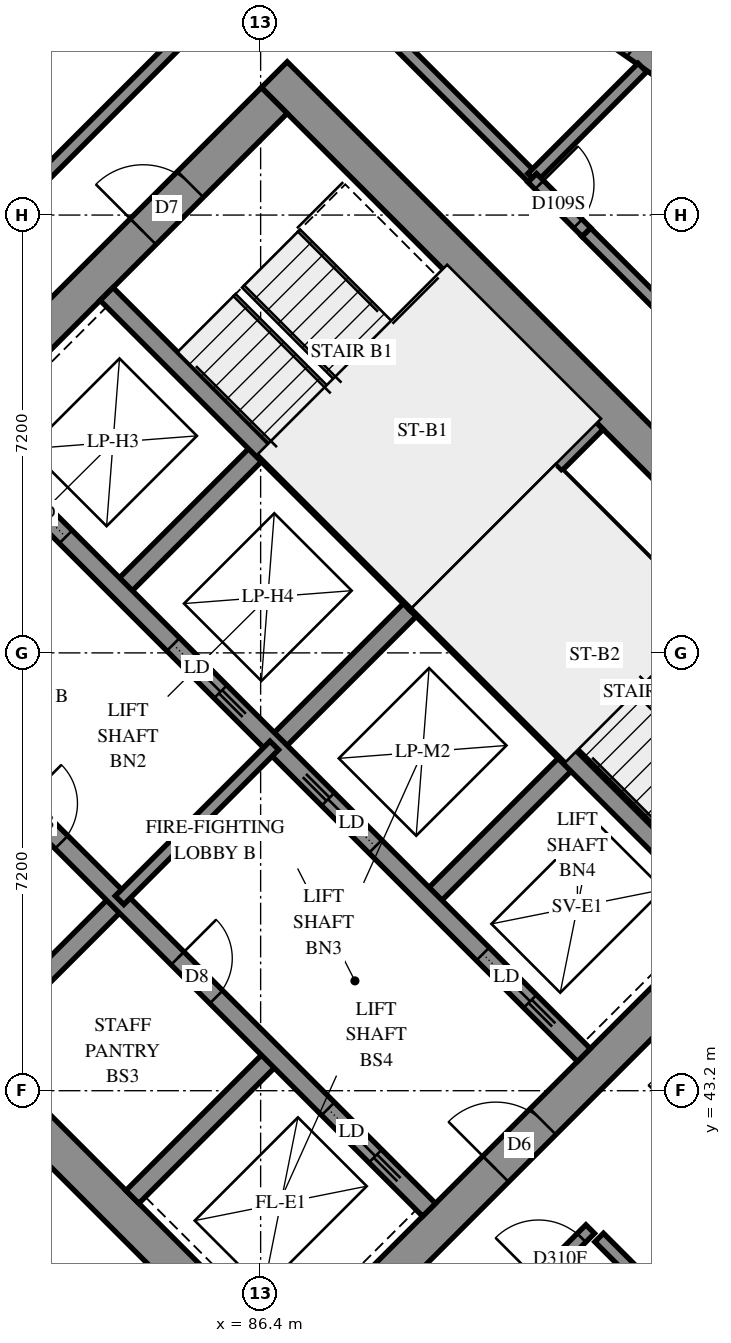
"""IFC4 building model, lengths in metres.
Left out: names, types, materials, properties, quantities, classifications, styles, units other than length and angle.
Written with IfcOpenShell. Run it as: python <this file> out.ifc"""

import sys

from ifc_helpers import new_model, si_unit, direction, frame, frame_2d, origin, place, context, subcontext, project, spatial, polyline, rectangle, outline, extrude, element, fill, save


model = new_model("IFC4")
c1 = context("Model", 3, precision=1e-05, world=origin(), true_north=direction((0.0, 1.0)))
c2 = subcontext(c1, "Body", "Model", "MODEL_VIEW")
j1 = project(units=[si_unit("LENGTHUNIT", "METRE"), si_unit("PLANEANGLEUNIT", "RADIAN")], contexts=[c1])
p1 = place(None, origin())
s1 = spatial("IfcSite", under=j1, at=p1, CompositionType="ELEMENT")
p2 = place(p1, origin())
s2 = spatial("IfcBuilding", under=s1, at=p2, CompositionType="ELEMENT")
p3 = place(p2, frame((0.0, 0.0, 169.4)))
s3 = spatial("IfcBuildingStorey", under=s2, at=p3, CompositionType="ELEMENT", Elevation=169.4)
p4 = place(p3, frame((76.018, 49.302, -0.3), z_axis=(0.0, 0.0, 1.0), x_axis=(0.7071067812, -0.7071067812, 0.0)))
e1 = element("IfcWall", 1, at=p4, inside=s3, PredefinedType="SHEAR", context=c2, shape_type="SweptSolid", body=[
    extrude(rectangle(XDim=15.6, YDim=0.6, at=frame_2d((7.8, 0.0))), origin(), (0.0, 0.0, 1.0), 2.7),
])
p5 = place(p3, frame((86.625, 59.908, -0.3), z_axis=(0.0, 0.0, 1.0), x_axis=(0.7071067812, -0.7071067812, 0.0)))
e2 = element("IfcWall", 2, at=p5, inside=s3, PredefinedType="SHEAR", context=c2, shape_type="SweptSolid", body=[
    extrude(rectangle(XDim=15.6, YDim=0.6, at=frame_2d((7.8, 0.0))), origin(), (0.0, 0.0, 1.0), 2.7),
])
p6 = place(p5, frame((10.6, 0.0, 0.3)))
e3 = element("IfcOpeningElement", 3, at=p6, cuts=e2, PredefinedType="OPENING", context=c2, shape_type="SweptSolid", body=[
    extrude(rectangle(XDim=0.8, YDim=2.1, at=frame_2d((0.4, 1.05))), frame((0.0, 0.31, 0.0), z_axis=(0.0, -1.0, 0.0), x_axis=(1.0, 0.0, 0.0)), (0.0, 0.0, 1.0), 0.62),
])
p7 = place(p3, frame((76.442, 49.302, -0.3), z_axis=(0.0, 0.0, 1.0), x_axis=(0.7071067812, 0.7071067812, 0.0)))
e4 = element("IfcWall", 4, at=p7, inside=s3, PredefinedType="SHEAR", context=c2, shape_type="SweptSolid", body=[
    extrude(rectangle(XDim=14.4, YDim=0.6, at=frame_2d((7.2, 0.0))), origin(), (0.0, 0.0, 1.0), 2.7),
])
p8 = place(p7, frame((4.55, 0.0, 0.3)))
e5 = element("IfcOpeningElement", 5, at=p8, cuts=e4, PredefinedType="OPENING", context=c2, shape_type="SweptSolid", body=[
    extrude(rectangle(XDim=1.1, YDim=2.1, at=frame_2d((0.55, 1.05))), frame((0.0, 0.31, 0.0), z_axis=(0.0, -1.0, 0.0), x_axis=(1.0, 0.0, 0.0)), (0.0, 0.0, 1.0), 0.62),
])
p9 = place(p7, frame((11.35, 0.0, 0.3)))
e6 = element("IfcOpeningElement", 6, at=p9, cuts=e4, PredefinedType="OPENING", context=c2, shape_type="SweptSolid", body=[
    extrude(rectangle(XDim=1.1, YDim=2.1, at=frame_2d((0.55, 1.05))), frame((0.0, 0.31, 0.0), z_axis=(0.0, -1.0, 0.0), x_axis=(1.0, 0.0, 0.0)), (0.0, 0.0, 1.0), 0.62),
])
p10 = place(p3, frame((87.049, 38.695, -0.3), z_axis=(0.0, 0.0, 1.0), x_axis=(0.7071067812, 0.7071067812, 0.0)))
e7 = element("IfcWall", 7, at=p10, inside=s3, PredefinedType="SHEAR", context=c2, shape_type="SweptSolid", body=[
    extrude(rectangle(XDim=14.4, YDim=0.6, at=frame_2d((7.2, 0.0))), origin(), (0.0, 0.0, 1.0), 2.7),
])
p11 = place(p10, frame((4.55, 0.0, 0.3)))
e8 = element("IfcOpeningElement", 8, at=p11, cuts=e7, PredefinedType="OPENING", context=c2, shape_type="SweptSolid", body=[
    extrude(rectangle(XDim=1.1, YDim=2.1, at=frame_2d((0.55, 1.05))), frame((0.0, 0.31, 0.0), z_axis=(0.0, -1.0, 0.0), x_axis=(1.0, 0.0, 0.0)), (0.0, 0.0, 1.0), 0.62),
])
p12 = place(p10, frame((11.35, 0.0, 0.3)))
e9 = element("IfcOpeningElement", 9, at=p12, cuts=e7, PredefinedType="OPENING", context=c2, shape_type="SweptSolid", body=[
    extrude(rectangle(XDim=1.1, YDim=2.1, at=frame_2d((0.55, 1.05))), frame((0.0, 0.31, 0.0), z_axis=(0.0, -1.0, 0.0), x_axis=(1.0, 0.0, 0.0)), (0.0, 0.0, 1.0), 0.62),
])
p13 = place(p3, frame((84.079, 51.423, 0.0), z_axis=(0.0, 0.0, 1.0), x_axis=(0.7071219326, 0.7070916295, 0.0)))
e10 = element("IfcWall", 10, at=p13, inside=s3, PredefinedType="SOLIDWALL", context=c2, shape_type="SweptSolid", body=[
    extrude(rectangle(XDim=3.3, YDim=0.3, at=frame_2d((1.65, 0.0))), origin(), (0.0, 0.0, 1.0), 3.1),
])
p14 = place(p3, frame((81.746, 43.999, 0.0), z_axis=(0.0, 0.0, 1.0), x_axis=(0.7071067812, 0.7071067812, 0.0)))
e11 = element("IfcWall", 11, at=p14, inside=s3, PredefinedType="SOLIDWALL", context=c2, shape_type="SweptSolid", body=[
    extrude(rectangle(XDim=3.3, YDim=0.3, at=frame_2d((1.65, 0.0))), origin(), (0.0, 0.0, 1.0), 3.1),
])
p15 = place(p3, frame((86.625, 48.878, 0.0), z_axis=(0.0, 0.0, 1.0), x_axis=(0.7071067812, 0.7071067812, 0.0)))
e12 = element("IfcWall", 12, at=p15, inside=s3, PredefinedType="SOLIDWALL", context=c2, shape_type="SweptSolid", body=[
    extrude(rectangle(XDim=3.3, YDim=0.3, at=frame_2d((1.65, 0.0))), origin(), (0.0, 0.0, 1.0), 3.1),
])
p16 = place(p3, frame((84.291, 41.453, 0.0), z_axis=(0.0, 0.0, 1.0), x_axis=(0.7071067812, 0.7071067812, 0.0)))
e13 = element("IfcWall", 13, at=p16, inside=s3, PredefinedType="SOLIDWALL", context=c2, shape_type="SweptSolid", body=[
    extrude(rectangle(XDim=3.3, YDim=0.3, at=frame_2d((1.65, 0.0))), origin(), (0.0, 0.0, 1.0), 3.1),
])
p17 = place(p3, frame((89.17, 46.332, 0.0), z_axis=(0.0, 0.0, 1.0), x_axis=(0.7071067812, 0.7071067812, 0.0)))
e14 = element("IfcWall", 14, at=p17, inside=s3, PredefinedType="SOLIDWALL", context=c2, shape_type="SweptSolid", body=[
    extrude(rectangle(XDim=3.3, YDim=0.3, at=frame_2d((1.65, 0.0))), origin(), (0.0, 0.0, 1.0), 3.1),
])
p18 = place(p3, frame((78.988, 51.423, 0.0), z_axis=(0.0, 0.0, 1.0), x_axis=(0.7071067812, -0.7071067812, 0.0)))
e15 = element("IfcWall", 15, at=p18, inside=s3, PredefinedType="SOLIDWALL", context=c2, shape_type="SweptSolid", body=[
    extrude(rectangle(XDim=14.4, YDim=0.3, at=frame_2d((7.2, 0.0))), origin(), (0.0, 0.0, 1.0), 3.1),
])
p19 = place(p18, frame((1.35, 0.0, 0.0)))
e16 = element("IfcOpeningElement", 16, at=p19, cuts=e15, PredefinedType="OPENING", context=c2, shape_type="SweptSolid", body=[
    extrude(rectangle(XDim=0.9, YDim=2.1, at=frame_2d((0.45, 1.05))), frame((0.0, 0.16, 0.0), z_axis=(0.0, -1.0, 0.0), x_axis=(1.0, 0.0, 0.0)), (0.0, 0.0, 1.0), 0.32),
])
p20 = place(p18, frame((4.95, 0.0, 0.0)))
e17 = element("IfcOpeningElement", 17, at=p20, cuts=e15, PredefinedType="OPENING", context=c2, shape_type="SweptSolid", body=[
    extrude(rectangle(XDim=0.9, YDim=2.1, at=frame_2d((0.45, 1.05))), frame((0.0, 0.16, 0.0), z_axis=(0.0, -1.0, 0.0), x_axis=(1.0, 0.0, 0.0)), (0.0, 0.0, 1.0), 0.32),
])
p21 = place(p18, frame((8.55, 0.0, 0.0)))
e18 = element("IfcOpeningElement", 18, at=p21, cuts=e15, PredefinedType="OPENING", context=c2, shape_type="SweptSolid", body=[
    extrude(rectangle(XDim=0.9, YDim=2.1, at=frame_2d((0.45, 1.05))), frame((0.0, 0.16, 0.0), z_axis=(0.0, -1.0, 0.0), x_axis=(1.0, 0.0, 0.0)), (0.0, 0.0, 1.0), 0.32),
])
p22 = place(p18, frame((12.05, 0.0, 0.0)))
e19 = element("IfcOpeningElement", 19, at=p22, cuts=e15, PredefinedType="OPENING", context=c2, shape_type="SweptSolid", body=[
    extrude(rectangle(XDim=1.1, YDim=2.1, at=frame_2d((0.55, 1.05))), frame((0.0, 0.16, 0.0), z_axis=(0.0, -1.0, 0.0), x_axis=(1.0, 0.0, 0.0)), (0.0, 0.0, 1.0), 0.32),
])
p23 = place(p3, frame((81.534, 53.969, 0.0), z_axis=(0.0, 0.0, 1.0), x_axis=(0.707103309, -0.7071102534, 0.0)))
e20 = element("IfcWall", 20, at=p23, inside=s3, PredefinedType="SOLIDWALL", context=c2, shape_type="SweptSolid", body=[
    extrude(rectangle(XDim=14.4, YDim=0.3, at=frame_2d((7.2, 0.0))), origin(), (0.0, 0.0, 1.0), 3.1),
])
p24 = place(p23, frame((1.25, 0.0, 0.0)))
e21 = element("IfcOpeningElement", 21, at=p24, cuts=e20, PredefinedType="OPENING", context=c2, shape_type="SweptSolid", body=[
    extrude(rectangle(XDim=1.1, YDim=2.1, at=frame_2d((0.55, 1.05))), frame((0.0, 0.16, 0.0), z_axis=(0.0, -1.0, 0.0), x_axis=(1.0, 0.0, 0.0)), (0.0, 0.0, 1.0), 0.32),
])
p25 = place(p23, frame((4.85, 0.0, 0.0)))
e22 = element("IfcOpeningElement", 22, at=p25, cuts=e20, PredefinedType="OPENING", context=c2, shape_type="SweptSolid", body=[
    extrude(rectangle(XDim=1.1, YDim=2.1, at=frame_2d((0.55, 1.05))), frame((0.0, 0.16, 0.0), z_axis=(0.0, -1.0, 0.0), x_axis=(1.0, 0.0, 0.0)), (0.0, 0.0, 1.0), 0.32),
])
p26 = place(p23, frame((8.45, 0.0, 0.0)))
e23 = element("IfcOpeningElement", 23, at=p26, cuts=e20, PredefinedType="OPENING", context=c2, shape_type="SweptSolid", body=[
    extrude(rectangle(XDim=1.1, YDim=2.1, at=frame_2d((0.55, 1.05))), frame((0.0, 0.16, 0.0), z_axis=(0.0, -1.0, 0.0), x_axis=(1.0, 0.0, 0.0)), (0.0, 0.0, 1.0), 0.32),
])
p27 = place(p23, frame((12.05, 0.0, 0.0)))
e24 = element("IfcOpeningElement", 24, at=p27, cuts=e20, PredefinedType="OPENING", context=c2, shape_type="SweptSolid", body=[
    extrude(rectangle(XDim=1.1, YDim=2.1, at=frame_2d((0.55, 1.05))), frame((0.0, 0.16, 0.0), z_axis=(0.0, -1.0, 0.0), x_axis=(1.0, 0.0, 0.0)), (0.0, 0.0, 1.0), 0.32),
])
for number, where, z_axis, x_axis in (
    (25, (83.867, 56.302, 0.0), (0.0, 0.0, 1.0), (0.707, -0.707, 0.0)),
    (26, (88.958, 51.211, 0.0), (0.0, 0.0, 1.0), (0.707, -0.707, 0.0)),
):
    element("IfcWall", number, at=place(p3, frame(where, z_axis=z_axis, x_axis=x_axis)), inside=s3, PredefinedType="SOLIDWALL", context=c2, shape_type="SweptSolid", body=[
        extrude(rectangle(XDim=7.2, YDim=0.3, at=frame_2d((3.6, 0.0))), origin(), (0.0, 0.0, 1.0), 3.1),
    ])
p28 = place(p3, frame((88.958, 51.211, 0.0), z_axis=(0.0, 0.0, 1.0), x_axis=(0.7071067812, 0.7071067812, 0.0)))
e27 = element("IfcWall", 27, at=p28, inside=s3, PredefinedType="SOLIDWALL", context=c2, shape_type="SweptSolid", body=[
    extrude(rectangle(XDim=4.2, YDim=0.3, at=frame_2d((2.1, 0.0))), origin(), (0.0, 0.0, 1.0), 3.1),
])
p29 = place(p3, frame((93.944, 59.447, 0.0), z_axis=(0.0, 0.0, 1.0), x_axis=(-0.8202082464, 0.5720650597, 0.0)))
e28 = element("IfcWall", 28, at=p29, inside=s3, PredefinedType="SOLIDWALL", context=c2, shape_type="SweptSolid", body=[
    extrude(outline(polyline([(-0.045, -0.25), (3.392, -0.25), (3.481, 0.25), (0.045, 0.25), (-0.045, -0.25)])), origin(), (0.0, 0.0, 1.0), 3.1),
])
p30 = place(p29, frame((1.68, 0.0, 0.45)))
e29 = element("IfcOpeningElement", 29, at=p30, cuts=e28, PredefinedType="OPENING", context=c2, shape_type="SweptSolid", body=[
    extrude(rectangle(XDim=1.2, YDim=2.5, at=frame_2d((0.6, 1.25))), frame((0.0, 0.26, 0.0), z_axis=(0.0, -1.0, 0.0), x_axis=(1.0, 0.0, 0.0)), (0.0, 0.0, 1.0), 0.52),
])
p31 = place(p3, frame((91.313, 53.354, 0.0), z_axis=(0.0, 0.0, 1.0), x_axis=(0.7071140275, -0.7070995348, 0.0)))
e30 = element("IfcWall", 30, at=p31, inside=s3, PredefinedType="PARTITIONING", context=c2, shape_type="SweptSolid", body=[
    extrude(rectangle(XDim=6.9, YDim=0.15, at=frame_2d((3.45, 0.0))), origin(), (0.0, 0.0, 1.0), 3.1),
])
p32 = place(p3, frame((84.079, 46.332, 0.0), z_axis=(0.0, 0.0, 1.0), x_axis=(0.7071067812, 0.7071067812, 0.0)))
e31 = element("IfcWall", 31, at=p32, inside=s3, PredefinedType="PARTITIONING", context=c2, shape_type="SweptSolid", body=[
    extrude(rectangle(XDim=3.6, YDim=0.2, at=frame_2d((1.8, 0.0))), origin(), (0.0, 0.0, 1.0), 3.1),
])
p33 = place(p3, frame((91.967, 40.785, 0.0), z_axis=(0.0, 0.0, 1.0), x_axis=(0.7071067812, -0.7071067812, 0.0)))
e32 = element("IfcWall", 32, at=p33, inside=s3, PredefinedType="PARTITIONING", context=c2, shape_type="SweptSolid", body=[
    extrude(rectangle(XDim=12.1, YDim=0.2, at=frame_2d((6.05, 0.0))), origin(), (0.0, 0.0, 1.0), 3.1),
])
p34 = place(p33, frame((3.448, 0.0, 0.0)))
e33 = element("IfcOpeningElement", 33, at=p34, cuts=e32, PredefinedType="OPENING", context=c2, shape_type="SweptSolid", body=[
    extrude(rectangle(XDim=0.9, YDim=2.1, at=frame_2d((0.45, 1.05))), frame((0.0, 0.11, 0.0), z_axis=(0.0, -1.0, 0.0), x_axis=(1.0, 0.0, 0.0)), (0.0, 0.0, 1.0), 0.22),
])
p35 = place(p33, frame((8.457, 0.0, 0.0)))
e34 = element("IfcOpeningElement", 34, at=p35, cuts=e32, PredefinedType="OPENING", context=c2, shape_type="SweptSolid", body=[
    extrude(rectangle(XDim=1.0, YDim=2.1, at=frame_2d((0.5, 1.05))), frame((0.0, 0.11, 0.0), z_axis=(0.0, -1.0, 0.0), x_axis=(1.0, 0.0, 0.0)), (0.0, 0.0, 1.0), 0.22),
])
p36 = place(p3, frame((91.755, 57.317, 0.0), z_axis=(0.0, 0.0, 1.0), x_axis=(0.7071067812, -0.7071067812, 0.0)))
e35 = element("IfcWall", 35, at=p36, inside=s3, PredefinedType="PARTITIONING", context=c2, shape_type="SweptSolid", body=[
    extrude(rectangle(XDim=11.639, YDim=0.2, at=frame_2d((5.819, 0.0))), origin(), (0.0, 0.0, 1.0), 3.1),
])
p37 = place(p3, frame((80.154, 55.56, 0.0), z_axis=(0.0, 0.0, 1.0), x_axis=(0.7071067812, 0.7071067812, 0.0)))
e36 = element("IfcWall", 36, at=p37, inside=s3, PredefinedType="PARTITIONING", context=c2, shape_type="SweptSolid", body=[
    extrude(rectangle(XDim=9.45, YDim=0.2, at=frame_2d((4.725, 0.0))), origin(), (0.0, 0.0, 1.0), 3.1),
])
p38 = place(p37, frame((0.292, 0.0, 0.0)))
e37 = element("IfcOpeningElement", 37, at=p38, cuts=e36, PredefinedType="OPENING", context=c2, shape_type="SweptSolid", body=[
    extrude(rectangle(XDim=1.0, YDim=2.1, at=frame_2d((0.5, 1.05))), frame((0.0, 0.11, 0.0), z_axis=(0.0, -1.0, 0.0), x_axis=(1.0, 0.0, 0.0)), (0.0, 0.0, 1.0), 0.22),
])
p39 = place(p3, frame((80.899, 41.869, 0.0), z_axis=(0.0, 0.0, 1.0), x_axis=(0.7071067812, -0.7071067812, 0.0)))
e38 = element("IfcWall", 38, at=p39, inside=s3, PredefinedType="PARTITIONING", context=c2, shape_type="SweptSolid", body=[
    extrude(rectangle(XDim=8.392, YDim=0.2, at=frame_2d((4.196, 0.0))), origin(), (0.0, 0.0, 1.0), 3.1),
])
p40 = place(p39, frame((4.979, 0.0, 0.0)))
e39 = element("IfcOpeningElement", 39, at=p40, cuts=e38, PredefinedType="OPENING", context=c2, shape_type="SweptSolid", body=[
    extrude(rectangle(XDim=0.9, YDim=2.1, at=frame_2d((0.45, 1.05))), frame((0.0, 0.11, 0.0), z_axis=(0.0, -1.0, 0.0), x_axis=(1.0, 0.0, 0.0)), (0.0, 0.0, 1.0), 0.22),
])
p41 = place(p3, frame((86.834, 35.94, 0.0), z_axis=(0.0, 0.0, 1.0), x_axis=(0.7072486139, 0.7069649201, 0.0)))
e40 = element("IfcWall", 40, at=p41, inside=s3, PredefinedType="PARTITIONING", context=c2, shape_type="SweptSolid", body=[
    extrude(rectangle(XDim=7.05, YDim=0.2, at=frame_2d((3.525, 0.0))), origin(), (0.0, 0.0, 1.0), 3.1),
])
p42 = place(p41, frame((5.848, 0.0, 0.0)))
e41 = element("IfcOpeningElement", 41, at=p42, cuts=e40, PredefinedType="OPENING", context=c2, shape_type="SweptSolid", body=[
    extrude(rectangle(XDim=1.0, YDim=2.1, at=frame_2d((0.5, 1.05))), frame((0.0, 0.11, 0.0), z_axis=(0.0, -1.0, 0.0), x_axis=(1.0, 0.0, 0.0)), (0.0, 0.0, 1.0), 0.22),
])
p43 = place(p3, frame((86.841, 62.245, 0.0), z_axis=(0.0, 0.0, 1.0), x_axis=(0.7071067812, -0.7071067812, 0.0)))
e42 = element("IfcWall", 42, at=p43, inside=s3, PredefinedType="PARTITIONING", context=c2, shape_type="SweptSolid", body=[
    extrude(rectangle(XDim=5.699, YDim=0.2, at=frame_2d((2.85, 0.0))), origin(), (0.0, 0.0, 1.0), 3.1),
])
p44 = place(p3, frame((90.867, 58.213, 0.0), z_axis=(0.0, 0.0, 1.0), x_axis=(0.7066186165, 0.7075946091, 0.0)))
e43 = element("IfcWall", 43, at=p44, inside=s3, PredefinedType="PARTITIONING", context=c2, shape_type="SweptSolid", body=[
    extrude(rectangle(XDim=2.562, YDim=0.2, at=frame_2d((1.281, 0.0))), origin(), (0.0, 0.0, 1.0), 3.1),
])
p45 = place(p3, frame((90.867, 58.211, 0.0), z_axis=(0.0, 0.0, 1.0), x_axis=(0.706312726, -0.7078999456, 0.0)))
e44 = element("IfcWall", 44, at=p45, inside=s3, PredefinedType="PARTITIONING", context=c2, shape_type="SweptSolid", body=[
    extrude(rectangle(XDim=1.26, YDim=0.2, at=frame_2d((0.63, 0.0))), origin(), (0.0, 0.0, 1.0), 3.1),
])
p46 = place(p45, frame((0.162, 0.0, 0.0)))
e45 = element("IfcOpeningElement", 45, at=p46, cuts=e44, PredefinedType="OPENING", context=c2, shape_type="SweptSolid", body=[
    extrude(rectangle(XDim=0.9, YDim=2.1, at=frame_2d((0.45, 1.05))), frame((0.0, 0.11, 0.0), z_axis=(0.0, -1.0, 0.0), x_axis=(1.0, 0.0, 0.0)), (0.0, 0.0, 1.0), 0.22),
])
p47 = place(p30, origin())
e46 = element("IfcWindow", 46, at=p47, inside=s3, PartitioningType="SINGLE_PANEL", PredefinedType="WINDOW", context=c2, shape_type="SweptSolid", body=[
    extrude(rectangle(XDim=1.2, YDim=2.5, at=frame_2d((0.6, 1.25))), frame((0.0, 0.18, 0.0), z_axis=(0.0, -1.0, 0.0), x_axis=(1.0, 0.0, 0.0)), (0.0, 0.0, 1.0), 0.06),
])
fill(e29, e46)
p48 = place(p11, origin())
e47 = element("IfcDoor", 47, at=p48, inside=s3, OperationType="DOUBLE_DOOR_SINGLE_SWING", PredefinedType="DOOR", context=c2, shape_type="SweptSolid", body=[
    extrude(rectangle(XDim=1.1, YDim=2.1, at=frame_2d((0.55, 1.05))), frame((0.0, 0.025, 0.0), z_axis=(0.0, -1.0, 0.0), x_axis=(1.0, 0.0, 0.0)), (0.0, 0.0, 1.0), 0.05),
])
fill(e8, e47)
p49 = place(p9, origin())
e48 = element("IfcDoor", 48, at=p49, inside=s3, OperationType="SINGLE_SWING_LEFT", PredefinedType="DOOR", context=c2, shape_type="SweptSolid", body=[
    extrude(rectangle(XDim=1.1, YDim=2.1, at=frame_2d((0.55, 1.05))), frame((0.0, 0.025, 0.0), z_axis=(0.0, -1.0, 0.0), x_axis=(1.0, 0.0, 0.0)), (0.0, 0.0, 1.0), 0.05),
])
fill(e6, e48)
p50 = place(p20, origin())
e49 = element("IfcDoor", 49, at=p50, inside=s3, OperationType="SINGLE_SWING_LEFT", PredefinedType="DOOR", context=c2, shape_type="SweptSolid", body=[
    extrude(rectangle(XDim=0.9, YDim=2.1, at=frame_2d((0.45, 1.05))), frame((0.0, 0.025, 0.0), z_axis=(0.0, -1.0, 0.0), x_axis=(1.0, 0.0, 0.0)), (0.0, 0.0, 1.0), 0.05),
])
fill(e17, e49)
p51 = place(p21, origin())
e50 = element("IfcDoor", 50, at=p51, inside=s3, OperationType="SINGLE_SWING_LEFT", PredefinedType="DOOR", context=c2, shape_type="SweptSolid", body=[
    extrude(rectangle(XDim=0.9, YDim=2.1, at=frame_2d((0.45, 1.05))), frame((0.0, 0.025, 0.0), z_axis=(0.0, -1.0, 0.0), x_axis=(1.0, 0.0, 0.0)), (0.0, 0.0, 1.0), 0.05),
])
fill(e18, e50)
p52 = place(p22, origin())
e51 = element("IfcDoor", 51, at=p52, inside=s3, OperationType="SLIDING_TO_RIGHT", PredefinedType="DOOR", context=c2, shape_type="SweptSolid", body=[
    extrude(rectangle(XDim=1.1, YDim=2.1, at=frame_2d((0.55, 1.05))), frame((0.0, 0.025, 0.0), z_axis=(0.0, -1.0, 0.0), x_axis=(1.0, 0.0, 0.0)), (0.0, 0.0, 1.0), 0.05),
])
fill(e19, e51)
p53 = place(p24, origin())
e52 = element("IfcDoor", 52, at=p53, inside=s3, OperationType="SLIDING_TO_LEFT", PredefinedType="DOOR", context=c2, shape_type="SweptSolid", body=[
    extrude(rectangle(XDim=1.1, YDim=2.1, at=frame_2d((0.55, 1.05))), frame((0.0, 0.025, 0.0), z_axis=(0.0, -1.0, 0.0), x_axis=(1.0, 0.0, 0.0)), (0.0, 0.0, 1.0), 0.05),
])
fill(e21, e52)
p54 = place(p25, origin())
e53 = element("IfcDoor", 53, at=p54, inside=s3, OperationType="SLIDING_TO_RIGHT", PredefinedType="DOOR", context=c2, shape_type="SweptSolid", body=[
    extrude(rectangle(XDim=1.1, YDim=2.1, at=frame_2d((0.55, 1.05))), frame((0.0, 0.025, 0.0), z_axis=(0.0, -1.0, 0.0), x_axis=(1.0, 0.0, 0.0)), (0.0, 0.0, 1.0), 0.05),
])
fill(e22, e53)
p55 = place(p26, origin())
e54 = element("IfcDoor", 54, at=p55, inside=s3, OperationType="SLIDING_TO_LEFT", PredefinedType="DOOR", context=c2, shape_type="SweptSolid", body=[
    extrude(rectangle(XDim=1.1, YDim=2.1, at=frame_2d((0.55, 1.05))), frame((0.0, 0.025, 0.0), z_axis=(0.0, -1.0, 0.0), x_axis=(1.0, 0.0, 0.0)), (0.0, 0.0, 1.0), 0.05),
])
fill(e23, e54)
p56 = place(p27, origin())
e55 = element("IfcDoor", 55, at=p56, inside=s3, OperationType="SLIDING_TO_RIGHT", PredefinedType="DOOR", context=c2, shape_type="SweptSolid", body=[
    extrude(rectangle(XDim=1.1, YDim=2.1, at=frame_2d((0.55, 1.05))), frame((0.0, 0.025, 0.0), z_axis=(0.0, -1.0, 0.0), x_axis=(1.0, 0.0, 0.0)), (0.0, 0.0, 1.0), 0.05),
])
fill(e24, e55)
p57 = place(p46, origin())
e56 = element("IfcDoor", 56, at=p57, inside=s3, OperationType="SINGLE_SWING_RIGHT", PredefinedType="DOOR", context=c2, shape_type="SweptSolid", body=[
    extrude(rectangle(XDim=0.9, YDim=2.1, at=frame_2d((0.45, 1.05))), frame((0.0, 0.025, 0.0), z_axis=(0.0, -1.0, 0.0), x_axis=(1.0, 0.0, 0.0)), (0.0, 0.0, 1.0), 0.05),
])
fill(e45, e56)
p58 = place(p42, origin())
e57 = element("IfcDoor", 57, at=p58, inside=s3, OperationType="SINGLE_SWING_RIGHT", PredefinedType="DOOR", context=c2, shape_type="SweptSolid", body=[
    extrude(rectangle(XDim=1.0, YDim=2.1, at=frame_2d((0.5, 1.05))), frame((0.0, 0.025, 0.0), z_axis=(0.0, -1.0, 0.0), x_axis=(1.0, 0.0, 0.0)), (0.0, 0.0, 1.0), 0.05),
])
fill(e41, e57)
save(model, sys.argv[1])
